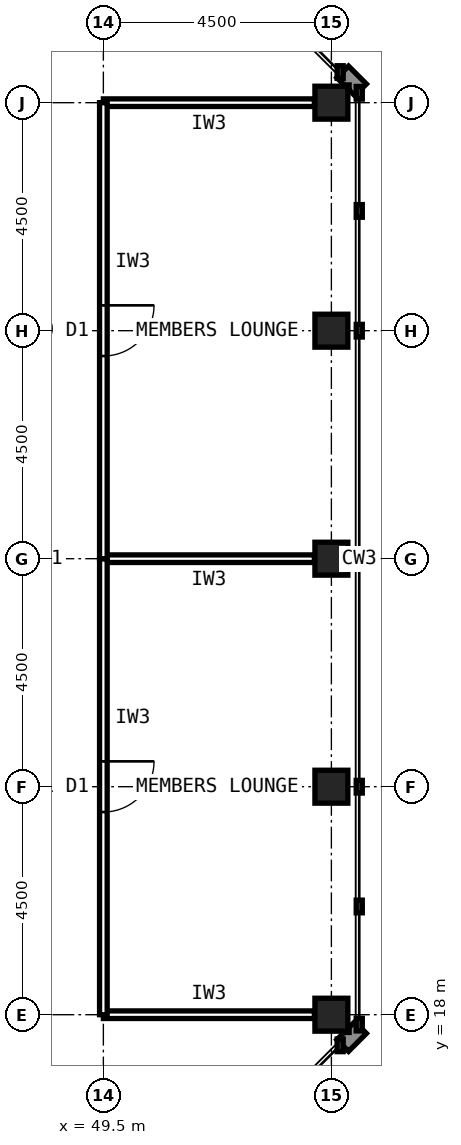
"""IFC4 building model, lengths in metres.
Left out: names, types, materials, properties, quantities, classifications, styles, units other than length and angle.
Written with IfcOpenShell. Run it as: python <this file> out.ifc"""

import sys

from ifc_helpers import new_model, si_unit, direction, frame, frame_2d, origin, origin_2d, place, context, subcontext, project, spatial, rectangle, hollow_rectangle, extrude, element, fill, save


model = new_model("IFC4")
c1 = context("Model", 3, precision=1e-05, world=origin(), true_north=direction((0.0, 1.0)))
c2 = subcontext(c1, "Body", "Model", "MODEL_VIEW")
j1 = project(units=[si_unit("LENGTHUNIT", "METRE"), si_unit("PLANEANGLEUNIT", "RADIAN")], contexts=[c1])
p1 = place(None, origin())
s1 = spatial("IfcSite", under=j1, at=p1, CompositionType="ELEMENT")
p2 = place(p1, origin())
s2 = spatial("IfcBuilding", under=s1, at=p2, CompositionType="ELEMENT")
p3 = place(p2, frame((0.0, 0.0, 210.6)))
s3 = spatial("IfcBuildingStorey", under=s2, at=p3, CompositionType="ELEMENT", Elevation=210.6)
for number, where, z_axis, x_axis in (
    (1, (54.0, 18.0, 0.0), (0.0, 0.0, 1.0), (1.0, 0.0, 0.0)),
    (2, (54.0, 22.5, 0.0), (0.0, 0.0, 1.0), (1.0, 0.0, 0.0)),
    (3, (54.0, 27.0, 0.0), (0.0, 0.0, 1.0), (1.0, 0.0, 0.0)),
    (4, (54.0, 31.5, 0.0), (0.0, 0.0, 1.0), (1.0, 0.0, 0.0)),
    (5, (54.0, 36.0, 0.0), (0.0, 0.0, 1.0), (1.0, 0.0, 0.0)),
):
    element("IfcColumn", number, at=place(p3, frame(where, z_axis=z_axis, x_axis=x_axis)), inside=s3, PredefinedType="COLUMN", context=c2, shape_type="SweptSolid", body=[
        extrude(hollow_rectangle(XDim=0.65, YDim=0.65, WallThickness=0.032, at=origin_2d()), origin(), (0.0, 0.0, 1.0), 4.0),
    ])
for number, where, z_axis, x_axis in (
    (6, (49.5, 18.0, 0.0), (0.0, 0.0, 1.0), (1.0, 0.0, 0.0)),
    (7, (53.665, 27.0, 0.0), (0.0, 0.0, 1.0), (-1.0, 0.0, 0.0)),
):
    element("IfcWall", number, at=place(p3, frame(where, z_axis=z_axis, x_axis=x_axis)), inside=s3, PredefinedType="PARTITIONING", context=c2, shape_type="SweptSolid", body=[
        extrude(rectangle(XDim=4.165, YDim=0.15, at=frame_2d((2.083, 0.0))), origin(), (0.0, 0.0, 1.0), 2.989),
    ])
p4 = place(p3, frame((49.5, 27.0, 0.0), z_axis=(0.0, 0.0, 1.0), x_axis=(0.0, -1.0, 0.0)))
e8 = element("IfcWall", 8, at=p4, inside=s3, PredefinedType="PARTITIONING", context=c2, shape_type="SweptSolid", body=[
    extrude(rectangle(XDim=9.0, YDim=0.15, at=frame_2d((4.5, 0.0))), origin(), (0.0, 0.0, 1.0), 3.84),
])
p5 = place(p4, frame((4.0, 0.0, 0.0)))
e9 = element("IfcOpeningElement", 9, at=p5, cuts=e8, PredefinedType="OPENING", context=c2, shape_type="SweptSolid", body=[
    extrude(rectangle(XDim=1.0, YDim=2.1, at=frame_2d((0.5, 1.05))), frame((0.0, 0.085, 0.0), z_axis=(0.0, -1.0, 0.0), x_axis=(1.0, 0.0, 0.0)), (0.0, 0.0, 1.0), 0.17),
])
p6 = place(p3, frame((53.665, 36.0, 0.0), z_axis=(0.0, 0.0, 1.0), x_axis=(-1.0, 0.0, 0.0)))
e10 = element("IfcWall", 10, at=p6, inside=s3, PredefinedType="PARTITIONING", context=c2, shape_type="SweptSolid", body=[
    extrude(rectangle(XDim=4.165, YDim=0.15, at=frame_2d((2.083, 0.0))), origin(), (0.0, 0.0, 1.0), 2.989),
])
p7 = place(p3, frame((49.5, 36.0, 0.0), z_axis=(0.0, 0.0, 1.0), x_axis=(0.0, -1.0, 0.0)))
e11 = element("IfcWall", 11, at=p7, inside=s3, PredefinedType="PARTITIONING", context=c2, shape_type="SweptSolid", body=[
    extrude(rectangle(XDim=9.0, YDim=0.15, at=frame_2d((4.5, 0.0))), origin(), (0.0, 0.0, 1.0), 3.84),
])
p8 = place(p7, frame((4.0, 0.0, 0.0)))
e12 = element("IfcOpeningElement", 12, at=p8, cuts=e11, PredefinedType="OPENING", context=c2, shape_type="SweptSolid", body=[
    extrude(rectangle(XDim=1.0, YDim=2.1, at=frame_2d((0.5, 1.05))), frame((0.0, 0.085, 0.0), z_axis=(0.0, -1.0, 0.0), x_axis=(1.0, 0.0, 0.0)), (0.0, 0.0, 1.0), 0.17),
])
p9 = place(p5, origin())
e13 = element("IfcDoor", 13, at=p9, inside=s3, OperationType="SINGLE_SWING_LEFT", PredefinedType="DOOR", context=c2, shape_type="SweptSolid", body=[
    extrude(rectangle(XDim=1.0, YDim=2.1, at=frame_2d((0.5, 1.05))), frame((0.0, 0.025, 0.0), z_axis=(0.0, -1.0, 0.0), x_axis=(1.0, 0.0, 0.0)), (0.0, 0.0, 1.0), 0.05),
])
fill(e9, e13)
p10 = place(p8, origin())
e14 = element("IfcDoor", 14, at=p10, inside=s3, OperationType="SINGLE_SWING_LEFT", PredefinedType="DOOR", context=c2, shape_type="SweptSolid", body=[
    extrude(rectangle(XDim=1.0, YDim=2.1, at=frame_2d((0.5, 1.05))), frame((0.0, 0.025, 0.0), z_axis=(0.0, -1.0, 0.0), x_axis=(1.0, 0.0, 0.0)), (0.0, 0.0, 1.0), 0.05),
])
fill(e12, e14)
save(model, sys.argv[1])
